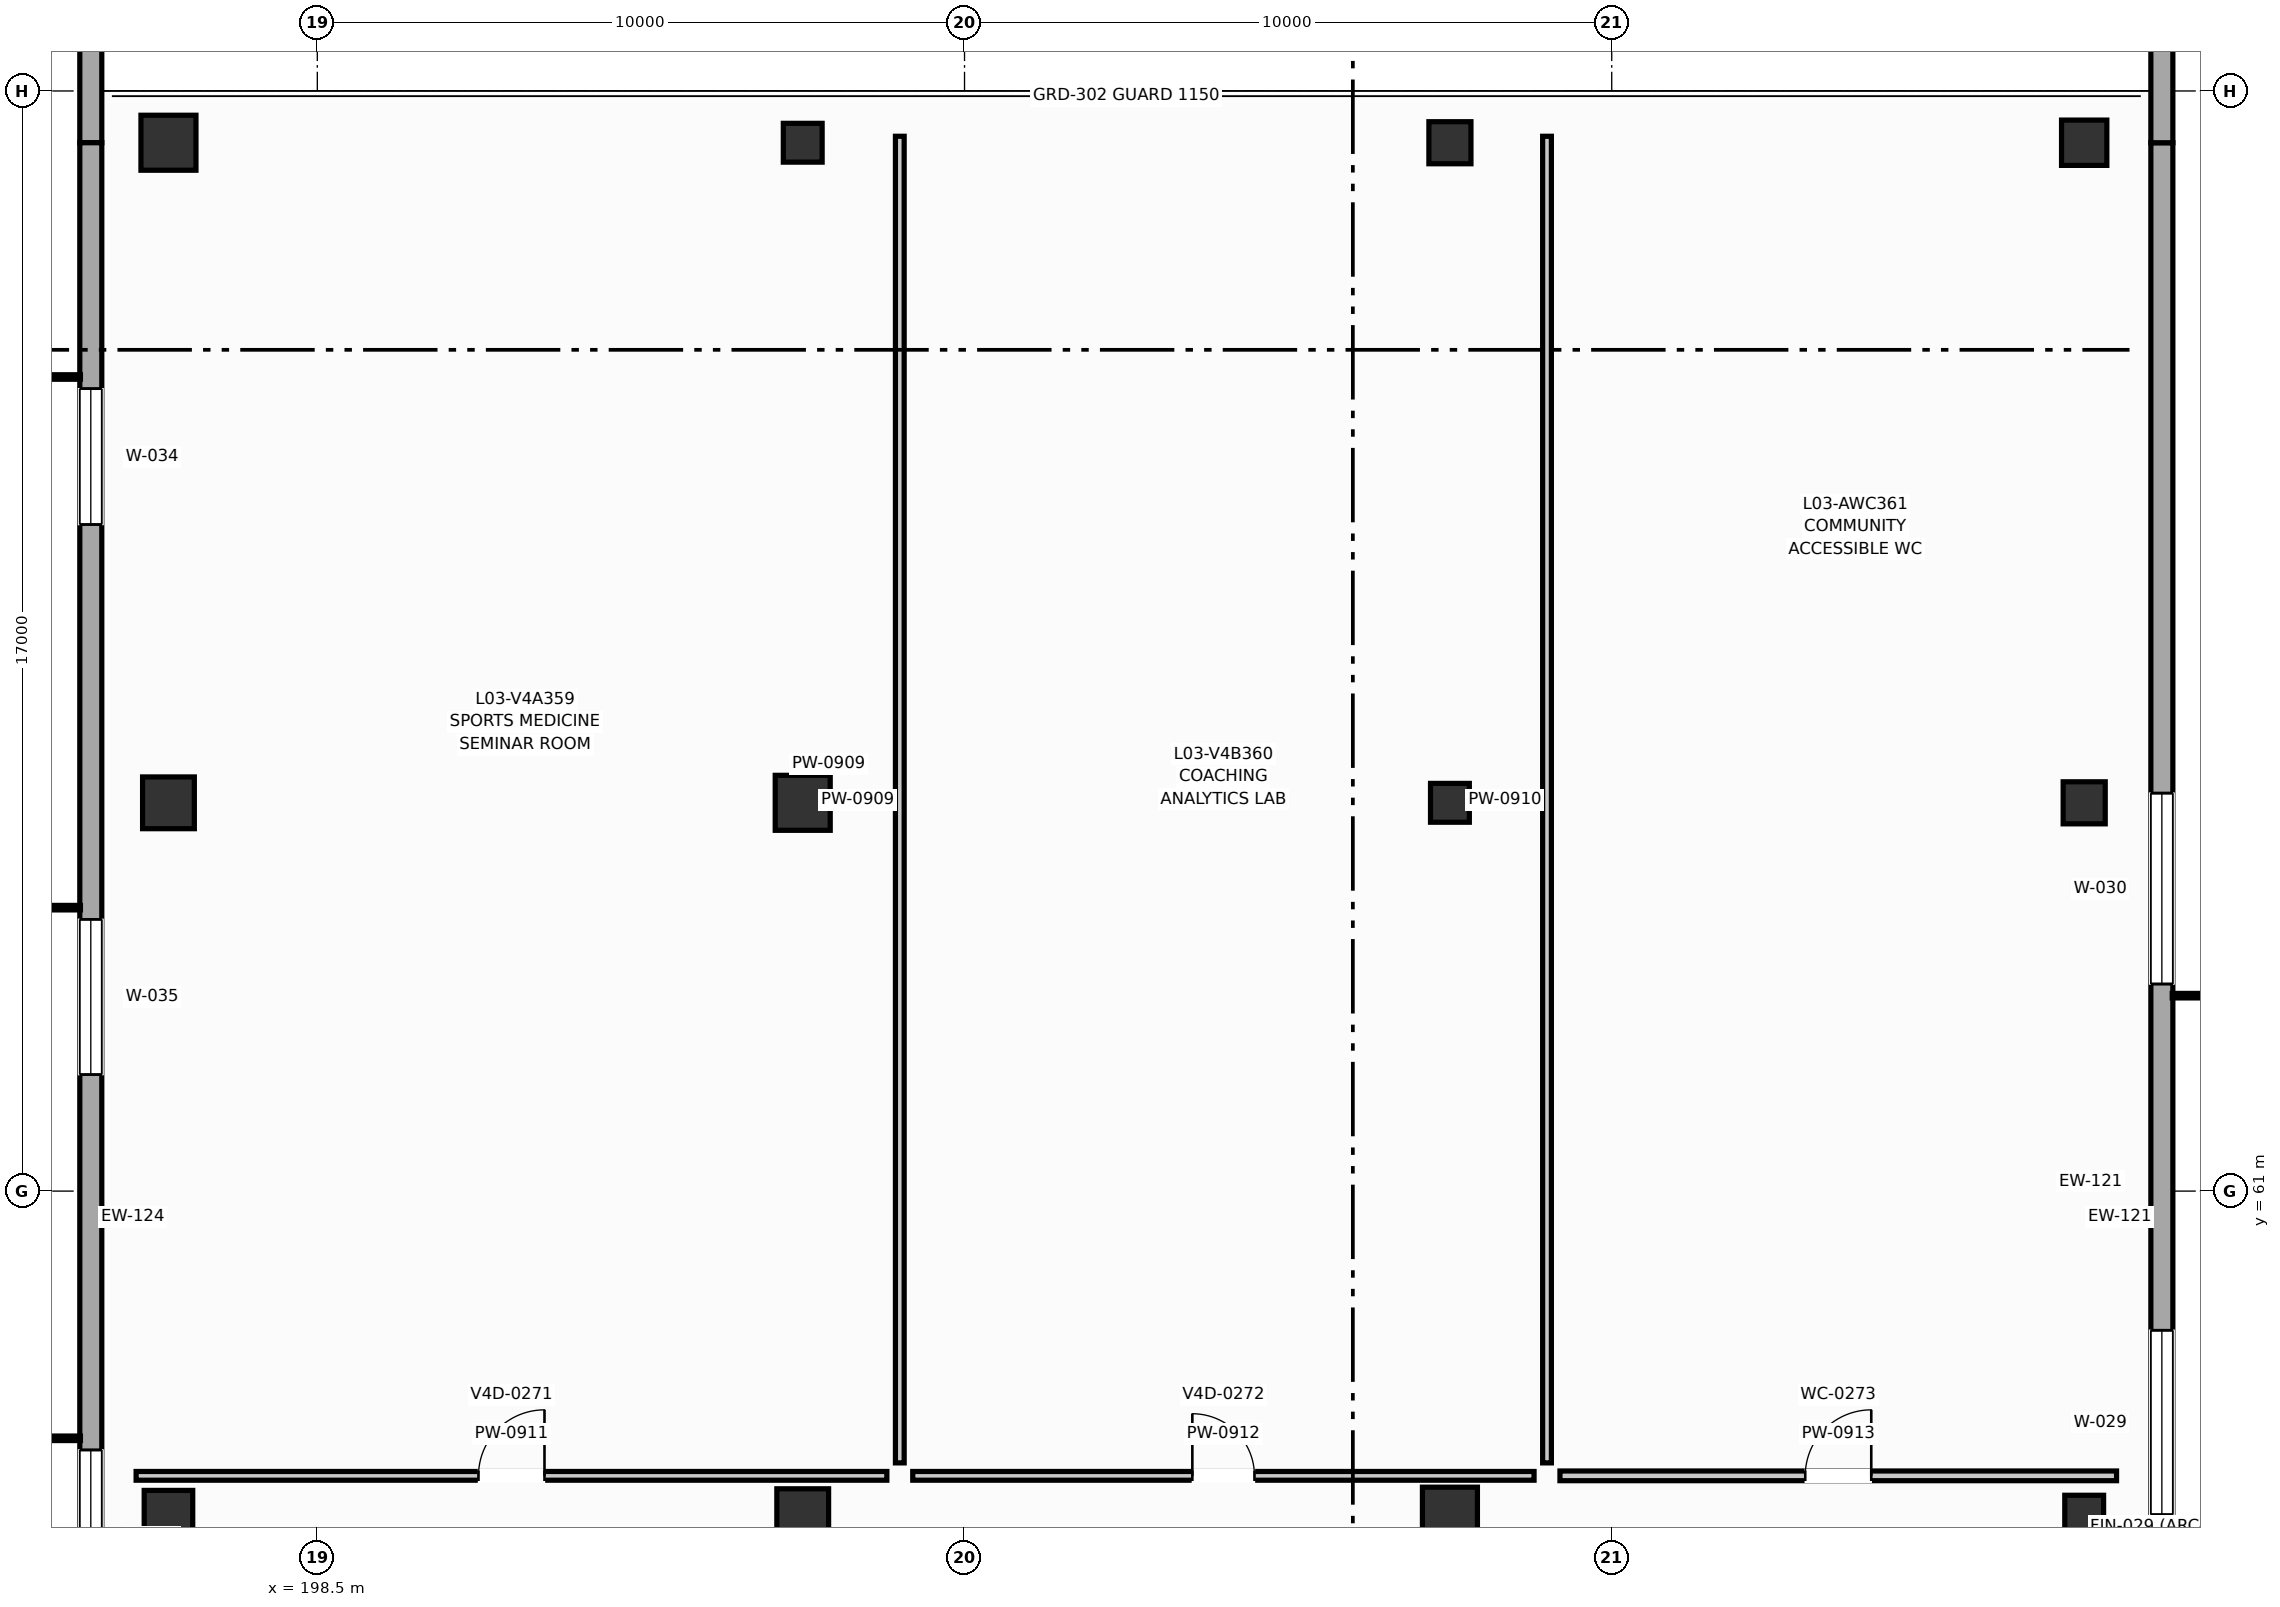
"""IFC4 building model, lengths in metres.
Left out: names, types, materials, properties, quantities, classifications, styles, units other than length and angle.
Written with IfcOpenShell. Run it as: python <this file> out.ifc"""

import sys

from ifc_helpers import new_model, si_unit, direction, frame, frame_2d, origin, origin_2d, place, context, subcontext, project, spatial, rectangle, extrude, element, fill, save


model = new_model("IFC4")
c1 = context("Model", 3, precision=1e-05, world=origin(), true_north=direction((0.0, 1.0)))
c2 = subcontext(c1, "Body", "Model", "MODEL_VIEW")
j1 = project(units=[si_unit("LENGTHUNIT", "METRE"), si_unit("PLANEANGLEUNIT", "RADIAN")], contexts=[c1])
p1 = place(None, origin())
s1 = spatial("IfcSite", under=j1, at=p1, CompositionType="ELEMENT")
p2 = place(p1, origin())
s2 = spatial("IfcBuilding", under=s1, at=p2, CompositionType="ELEMENT")
p3 = place(p2, frame((0.0, 0.0, 13.5)))
s3 = spatial("IfcBuildingStorey", under=s2, at=p3, CompositionType="ELEMENT", Elevation=13.5)
p4 = place(p3, frame((196.2, 56.0, 0.0), z_axis=(0.0, 0.0, 1.0), x_axis=(1.0, 0.0, 0.0)))
e1 = element("IfcColumn", 1, at=p4, inside=s3, PredefinedType="COLUMN", context=c2, shape_type="SweptSolid", body=[
    extrude(rectangle(XDim=0.75, YDim=0.75, at=origin_2d()), origin(), (0.0, 0.0, 1.0), 4.5),
])
p5 = place(p3, frame((196.2, 67.0, 0.0), z_axis=(0.0, 0.0, 1.0), x_axis=(1.0, 0.0, 0.0)))
e2 = element("IfcColumn", 2, at=p5, inside=s3, PredefinedType="COLUMN", context=c2, shape_type="SweptSolid", body=[
    extrude(rectangle(XDim=0.8, YDim=0.8, at=origin_2d()), origin(), (0.0, 0.0, 1.0), 4.5),
])
p6 = place(p3, frame((196.2, 77.2, 0.0), z_axis=(0.0, 0.0, 1.0), x_axis=(1.0, 0.0, 0.0)))
e3 = element("IfcColumn", 3, at=p6, inside=s3, PredefinedType="COLUMN", context=c2, shape_type="SweptSolid", body=[
    extrude(rectangle(XDim=0.85, YDim=0.85, at=origin_2d()), origin(), (0.0, 0.0, 1.0), 4.5),
])
p7 = place(p3, frame((206.0, 56.0, 0.0), z_axis=(0.0, 0.0, 1.0), x_axis=(1.0, 0.0, 0.0)))
e4 = element("IfcColumn", 4, at=p7, inside=s3, PredefinedType="COLUMN", context=c2, shape_type="SweptSolid", body=[
    extrude(rectangle(XDim=0.8, YDim=0.8, at=origin_2d()), origin(), (0.0, 0.0, 1.0), 4.5),
])
p8 = place(p3, frame((206.0, 67.0, 0.0), z_axis=(0.0, 0.0, 1.0), x_axis=(1.0, 0.0, 0.0)))
e5 = element("IfcColumn", 5, at=p8, inside=s3, PredefinedType="COLUMN", context=c2, shape_type="SweptSolid", body=[
    extrude(rectangle(XDim=0.85, YDim=0.85, at=origin_2d()), origin(), (0.0, 0.0, 1.0), 4.5),
])
p9 = place(p3, frame((206.0, 77.2, 0.0), z_axis=(0.0, 0.0, 1.0), x_axis=(1.0, 0.0, 0.0)))
e6 = element("IfcColumn", 6, at=p9, inside=s3, PredefinedType="COLUMN", context=c2, shape_type="SweptSolid", body=[
    extrude(rectangle(XDim=0.6, YDim=0.6, at=origin_2d()), origin(), (0.0, 0.0, 1.0), 4.5),
])
p10 = place(p3, frame((216.0, 56.0, 0.0), z_axis=(0.0, 0.0, 1.0), x_axis=(1.0, 0.0, 0.0)))
e7 = element("IfcColumn", 7, at=p10, inside=s3, PredefinedType="COLUMN", context=c2, shape_type="SweptSolid", body=[
    extrude(rectangle(XDim=0.85, YDim=0.85, at=origin_2d()), origin(), (0.0, 0.0, 1.0), 4.5),
])
p11 = place(p3, frame((216.0, 67.0, 0.0), z_axis=(0.0, 0.0, 1.0), x_axis=(1.0, 0.0, 0.0)))
e8 = element("IfcColumn", 8, at=p11, inside=s3, PredefinedType="COLUMN", context=c2, shape_type="SweptSolid", body=[
    extrude(rectangle(XDim=0.6, YDim=0.6, at=origin_2d()), origin(), (0.0, 0.0, 1.0), 4.5),
])
p12 = place(p3, frame((216.0, 77.2, 0.0), z_axis=(0.0, 0.0, 1.0), x_axis=(1.0, 0.0, 0.0)))
e9 = element("IfcColumn", 9, at=p12, inside=s3, PredefinedType="COLUMN", context=c2, shape_type="SweptSolid", body=[
    extrude(rectangle(XDim=0.65, YDim=0.65, at=origin_2d()), origin(), (0.0, 0.0, 1.0), 4.5),
])
p13 = place(p3, frame((225.8, 56.0, 0.0), z_axis=(0.0, 0.0, 1.0), x_axis=(1.0, 0.0, 0.0)))
e10 = element("IfcColumn", 10, at=p13, inside=s3, PredefinedType="COLUMN", context=c2, shape_type="SweptSolid", body=[
    extrude(rectangle(XDim=0.6, YDim=0.6, at=origin_2d()), origin(), (0.0, 0.0, 1.0), 4.5),
])
p14 = place(p3, frame((225.8, 67.0, 0.0), z_axis=(0.0, 0.0, 1.0), x_axis=(1.0, 0.0, 0.0)))
e11 = element("IfcColumn", 11, at=p14, inside=s3, PredefinedType="COLUMN", context=c2, shape_type="SweptSolid", body=[
    extrude(rectangle(XDim=0.65, YDim=0.65, at=origin_2d()), origin(), (0.0, 0.0, 1.0), 4.5),
])
p15 = place(p3, frame((225.8, 77.2, 0.0), z_axis=(0.0, 0.0, 1.0), x_axis=(1.0, 0.0, 0.0)))
e12 = element("IfcColumn", 12, at=p15, inside=s3, PredefinedType="COLUMN", context=c2, shape_type="SweptSolid", body=[
    extrude(rectangle(XDim=0.7, YDim=0.7, at=origin_2d()), origin(), (0.0, 0.0, 1.0), 4.5),
])
p16 = place(p3, frame((227.0, 44.0, 0.0), z_axis=(0.0, 0.0, 1.0), x_axis=(0.0, 1.0, 0.0)))
e13 = element("IfcWall", 13, at=p16, inside=s3, PredefinedType="SOLIDWALL", context=c2, shape_type="SweptSolid", body=[
    extrude(rectangle(XDim=33.2, YDim=0.34, at=frame_2d((16.6, 0.0))), origin(), (0.0, 0.0, 1.0), 3.55),
])
p17 = place(p16, frame((3.8, 0.0, 0.85)))
e14 = element("IfcOpeningElement", 14, at=p17, cuts=e13, PredefinedType="OPENING", context=c2, shape_type="SweptSolid", body=[
    extrude(rectangle(XDim=2.65, YDim=2.55, at=frame_2d((1.325, 1.275))), frame((0.0, 0.18, 0.0), z_axis=(0.0, -1.0, 0.0), x_axis=(1.0, 0.0, 0.0)), (0.0, 0.0, 1.0), 0.36),
])
p18 = place(p16, frame((12.0, 0.0, 0.85)))
e15 = element("IfcOpeningElement", 15, at=p18, cuts=e13, PredefinedType="OPENING", context=c2, shape_type="SweptSolid", body=[
    extrude(rectangle(XDim=2.85, YDim=2.5, at=frame_2d((1.425, 1.25))), frame((0.0, 0.18, 0.0), z_axis=(0.0, -1.0, 0.0), x_axis=(1.0, 0.0, 0.0)), (0.0, 0.0, 1.0), 0.36),
])
p19 = place(p16, frame((20.2, 0.0, 0.85)))
e16 = element("IfcOpeningElement", 16, at=p19, cuts=e13, PredefinedType="OPENING", context=c2, shape_type="SweptSolid", body=[
    extrude(rectangle(XDim=2.95, YDim=2.45, at=frame_2d((1.475, 1.225))), frame((0.0, 0.18, 0.0), z_axis=(0.0, -1.0, 0.0), x_axis=(1.0, 0.0, 0.0)), (0.0, 0.0, 1.0), 0.36),
])
p20 = place(p3, frame((227.0, 77.2, 0.0), z_axis=(0.0, 0.0, 1.0), x_axis=(0.0, 1.0, 0.0)))
e17 = element("IfcWall", 17, at=p20, inside=s3, PredefinedType="SOLIDWALL", context=c2, shape_type="SweptSolid", body=[
    extrude(rectangle(XDim=34.8, YDim=0.34, at=frame_2d((17.4, 0.0))), origin(), (0.0, 0.0, 1.0), 3.55),
])
p21 = place(p20, frame((3.8, 0.0, 0.85)))
e18 = element("IfcOpeningElement", 18, at=p21, cuts=e17, PredefinedType="OPENING", context=c2, shape_type="SweptSolid", body=[
    extrude(rectangle(XDim=3.1, YDim=2.35, at=frame_2d((1.55, 1.175))), frame((0.0, 0.18, 0.0), z_axis=(0.0, -1.0, 0.0), x_axis=(1.0, 0.0, 0.0)), (0.0, 0.0, 1.0), 0.36),
])
p22 = place(p20, frame((12.0, 0.0, 0.85)))
e19 = element("IfcOpeningElement", 19, at=p22, cuts=e17, PredefinedType="OPENING", context=c2, shape_type="SweptSolid", body=[
    extrude(rectangle(XDim=3.3, YDim=2.25, at=frame_2d((1.65, 1.125))), frame((0.0, 0.18, 0.0), z_axis=(0.0, -1.0, 0.0), x_axis=(1.0, 0.0, 0.0)), (0.0, 0.0, 1.0), 0.36),
])
p23 = place(p20, frame((20.2, 0.0, 0.85)))
e20 = element("IfcOpeningElement", 20, at=p23, cuts=e17, PredefinedType="OPENING", context=c2, shape_type="SweptSolid", body=[
    extrude(rectangle(XDim=1.8, YDim=2.4, at=frame_2d((0.9, 1.2))), frame((0.0, 0.18, 0.0), z_axis=(0.0, -1.0, 0.0), x_axis=(1.0, 0.0, 0.0)), (0.0, 0.0, 1.0), 0.36),
])
p24 = place(p3, frame((195.0, 112.0, 0.0), z_axis=(0.0, 0.0, 1.0), x_axis=(0.0, -1.0, 0.0)))
e21 = element("IfcWall", 21, at=p24, inside=s3, PredefinedType="SOLIDWALL", context=c2, shape_type="SweptSolid", body=[
    extrude(rectangle(XDim=34.8, YDim=0.34, at=frame_2d((17.4, 0.0))), origin(), (0.0, 0.0, 1.0), 3.55),
])
p25 = place(p3, frame((195.0, 77.2, 0.0), z_axis=(0.0, 0.0, 1.0), x_axis=(0.0, -1.0, 0.0)))
e22 = element("IfcWall", 22, at=p25, inside=s3, PredefinedType="SOLIDWALL", context=c2, shape_type="SweptSolid", body=[
    extrude(rectangle(XDim=33.2, YDim=0.34, at=frame_2d((16.6, 0.0))), origin(), (0.0, 0.0, 1.0), 3.55),
])
p26 = place(p25, frame((3.8, 0.0, 0.85)))
e23 = element("IfcOpeningElement", 23, at=p26, cuts=e22, PredefinedType="OPENING", context=c2, shape_type="SweptSolid", body=[
    extrude(rectangle(XDim=2.1, YDim=2.4, at=frame_2d((1.05, 1.2))), frame((0.0, 0.18, 0.0), z_axis=(0.0, -1.0, 0.0), x_axis=(1.0, 0.0, 0.0)), (0.0, 0.0, 1.0), 0.36),
])
p27 = place(p25, frame((12.0, 0.0, 0.85)))
e24 = element("IfcOpeningElement", 24, at=p27, cuts=e22, PredefinedType="OPENING", context=c2, shape_type="SweptSolid", body=[
    extrude(rectangle(XDim=2.4, YDim=2.6, at=frame_2d((1.2, 1.3))), frame((0.0, 0.18, 0.0), z_axis=(0.0, -1.0, 0.0), x_axis=(1.0, 0.0, 0.0)), (0.0, 0.0, 1.0), 0.36),
])
p28 = place(p25, frame((20.2, 0.0, 0.85)))
e25 = element("IfcOpeningElement", 25, at=p28, cuts=e22, PredefinedType="OPENING", context=c2, shape_type="SweptSolid", body=[
    extrude(rectangle(XDim=2.7, YDim=2.6, at=frame_2d((1.35, 1.3))), frame((0.0, 0.18, 0.0), z_axis=(0.0, -1.0, 0.0), x_axis=(1.0, 0.0, 0.0)), (0.0, 0.0, 1.0), 0.36),
])
for number, where, z_axis, x_axis in (
    (26, (207.5, 56.8, 0.0), (0.0, 0.0, 1.0), (0.0, 1.0, 0.0)),
    (27, (217.5, 56.8, 0.0), (0.0, 0.0, 1.0), (0.0, 1.0, 0.0)),
):
    element("IfcWall", number, at=place(p3, frame(where, z_axis=z_axis, x_axis=x_axis)), inside=s3, PredefinedType="PARTITIONING", context=c2, shape_type="SweptSolid", body=[
        extrude(rectangle(XDim=20.5, YDim=0.135, at=frame_2d((10.25, 0.0))), origin(), (0.0, 0.0, 1.0), 3.22),
    ])
p29 = place(p3, frame((195.7, 56.6, 0.0), z_axis=(0.0, 0.0, 1.0), x_axis=(1.0, 0.0, 0.0)))
e28 = element("IfcWall", 28, at=p29, inside=s3, PredefinedType="PARTITIONING", context=c2, shape_type="SweptSolid", body=[
    extrude(rectangle(XDim=11.6, YDim=0.135, at=frame_2d((5.8, 0.0))), origin(), (0.0, 0.0, 1.0), 3.22),
])
p30 = place(p29, frame((5.29, 0.0, 0.0)))
e29 = element("IfcOpeningElement", 29, at=p30, cuts=e28, PredefinedType="OPENING", context=c2, shape_type="SweptSolid", body=[
    extrude(rectangle(XDim=1.02, YDim=2.15, at=frame_2d((0.51, 1.075))), frame((0.0, 0.077, 0.0), z_axis=(0.0, -1.0, 0.0), x_axis=(1.0, 0.0, 0.0)), (0.0, 0.0, 1.0), 0.155),
])
p31 = place(p3, frame((207.7, 56.6, 0.0), z_axis=(0.0, 0.0, 1.0), x_axis=(1.0, 0.0, 0.0)))
e30 = element("IfcWall", 30, at=p31, inside=s3, PredefinedType="PARTITIONING", context=c2, shape_type="SweptSolid", body=[
    extrude(rectangle(XDim=9.6, YDim=0.135, at=frame_2d((4.8, 0.0))), origin(), (0.0, 0.0, 1.0), 3.22),
])
p32 = place(p31, frame((4.32, 0.0, 0.0)))
e31 = element("IfcOpeningElement", 31, at=p32, cuts=e30, PredefinedType="OPENING", context=c2, shape_type="SweptSolid", body=[
    extrude(rectangle(XDim=0.96, YDim=2.15, at=frame_2d((0.48, 1.075))), frame((0.0, 0.077, 0.0), z_axis=(0.0, -1.0, 0.0), x_axis=(1.0, 0.0, 0.0)), (0.0, 0.0, 1.0), 0.155),
])
p33 = place(p3, frame((217.7, 56.6, 0.0), z_axis=(0.0, 0.0, 1.0), x_axis=(1.0, 0.0, 0.0)))
e32 = element("IfcWall", 32, at=p33, inside=s3, PredefinedType="PARTITIONING", context=c2, shape_type="SweptSolid", body=[
    extrude(rectangle(XDim=8.6, YDim=0.15, at=frame_2d((4.3, 0.0))), origin(), (0.0, 0.0, 1.0), 3.22),
])
p34 = place(p33, frame((3.79, 0.0, 0.0)))
e33 = element("IfcOpeningElement", 33, at=p34, cuts=e32, PredefinedType="OPENING", context=c2, shape_type="SweptSolid", body=[
    extrude(rectangle(XDim=1.02, YDim=2.15, at=frame_2d((0.51, 1.075))), frame((0.0, 0.085, 0.0), z_axis=(0.0, -1.0, 0.0), x_axis=(1.0, 0.0, 0.0)), (0.0, 0.0, 1.0), 0.17),
])
p35 = place(p18, origin())
e34 = element("IfcWindow", 34, at=p35, inside=s3, PartitioningType="SINGLE_PANEL", PredefinedType="WINDOW", context=c2, shape_type="SweptSolid", body=[
    extrude(rectangle(XDim=2.85, YDim=2.5, at=frame_2d((1.425, 1.25))), frame((0.0, 0.03, 0.0), z_axis=(0.0, -1.0, 0.0), x_axis=(1.0, 0.0, 0.0)), (0.0, 0.0, 1.0), 0.06),
])
fill(e15, e34)
p36 = place(p19, origin())
e35 = element("IfcWindow", 35, at=p36, inside=s3, PartitioningType="SINGLE_PANEL", PredefinedType="WINDOW", context=c2, shape_type="SweptSolid", body=[
    extrude(rectangle(XDim=2.95, YDim=2.45, at=frame_2d((1.475, 1.225))), frame((0.0, 0.03, 0.0), z_axis=(0.0, -1.0, 0.0), x_axis=(1.0, 0.0, 0.0)), (0.0, 0.0, 1.0), 0.06),
])
fill(e16, e35)
p37 = place(p26, origin())
e36 = element("IfcWindow", 36, at=p37, inside=s3, PartitioningType="SINGLE_PANEL", PredefinedType="WINDOW", context=c2, shape_type="SweptSolid", body=[
    extrude(rectangle(XDim=2.1, YDim=2.4, at=frame_2d((1.05, 1.2))), frame((0.0, 0.03, 0.0), z_axis=(0.0, -1.0, 0.0), x_axis=(1.0, 0.0, 0.0)), (0.0, 0.0, 1.0), 0.06),
])
fill(e23, e36)
p38 = place(p27, origin())
e37 = element("IfcWindow", 37, at=p38, inside=s3, PartitioningType="SINGLE_PANEL", PredefinedType="WINDOW", context=c2, shape_type="SweptSolid", body=[
    extrude(rectangle(XDim=2.4, YDim=2.6, at=frame_2d((1.2, 1.3))), frame((0.0, 0.03, 0.0), z_axis=(0.0, -1.0, 0.0), x_axis=(1.0, 0.0, 0.0)), (0.0, 0.0, 1.0), 0.06),
])
fill(e24, e37)
p39 = place(p28, origin())
e38 = element("IfcWindow", 38, at=p39, inside=s3, PartitioningType="SINGLE_PANEL", PredefinedType="WINDOW", context=c2, shape_type="SweptSolid", body=[
    extrude(rectangle(XDim=2.7, YDim=2.6, at=frame_2d((1.35, 1.3))), frame((0.0, 0.03, 0.0), z_axis=(0.0, -1.0, 0.0), x_axis=(1.0, 0.0, 0.0)), (0.0, 0.0, 1.0), 0.06),
])
fill(e25, e38)
p40 = place(p30, origin())
e39 = element("IfcDoor", 39, at=p40, inside=s3, OperationType="SINGLE_SWING_RIGHT", PredefinedType="DOOR", context=c2, shape_type="SweptSolid", body=[
    extrude(rectangle(XDim=1.02, YDim=2.15, at=frame_2d((0.51, 1.075))), frame((0.0, 0.025, 0.0), z_axis=(0.0, -1.0, 0.0), x_axis=(1.0, 0.0, 0.0)), (0.0, 0.0, 1.0), 0.05),
])
fill(e29, e39)
p41 = place(p32, origin())
e40 = element("IfcDoor", 40, at=p41, inside=s3, OperationType="SINGLE_SWING_LEFT", PredefinedType="DOOR", context=c2, shape_type="SweptSolid", body=[
    extrude(rectangle(XDim=0.96, YDim=2.15, at=frame_2d((0.48, 1.075))), frame((0.0, 0.025, 0.0), z_axis=(0.0, -1.0, 0.0), x_axis=(1.0, 0.0, 0.0)), (0.0, 0.0, 1.0), 0.05),
])
fill(e31, e40)
p42 = place(p34, origin())
e41 = element("IfcDoor", 41, at=p42, inside=s3, OperationType="SINGLE_SWING_RIGHT", PredefinedType="DOOR", context=c2, shape_type="SweptSolid", body=[
    extrude(rectangle(XDim=1.02, YDim=2.15, at=frame_2d((0.51, 1.075))), frame((0.0, 0.025, 0.0), z_axis=(0.0, -1.0, 0.0), x_axis=(1.0, 0.0, 0.0)), (0.0, 0.0, 1.0), 0.05),
])
fill(e33, e41)
save(model, sys.argv[1])
